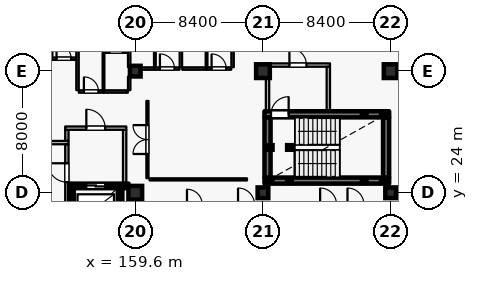
"""IFC4 building model, lengths in metres.
Left out: names, types, materials, properties, quantities, classifications, styles, units other than length and angle.
Written with IfcOpenShell. Run it as: python <this file> out.ifc"""

import sys

from ifc_helpers import new_model, si_unit, direction, frame, frame_2d, origin, origin_2d, place, context, subcontext, project, spatial, rectangle, hollow_rectangle, extrude, element, fill, save


model = new_model("IFC4")
c1 = context("Model", 3, precision=1e-05, world=origin(), true_north=direction((0.0, 1.0)))
c2 = subcontext(c1, "Body", "Model", "MODEL_VIEW")
j1 = project(units=[si_unit("LENGTHUNIT", "METRE"), si_unit("PLANEANGLEUNIT", "RADIAN")], contexts=[c1])
p1 = place(None, origin())
s1 = spatial("IfcSite", under=j1, at=p1, CompositionType="ELEMENT")
p2 = place(p1, origin())
s2 = spatial("IfcBuilding", under=s1, at=p2, CompositionType="ELEMENT")
p3 = place(p2, frame((0.0, 0.0, 25.2)))
s3 = spatial("IfcBuildingStorey", under=s2, at=p3, CompositionType="ELEMENT", Elevation=25.2)
for number, where, z_axis, x_axis in (
    (1, (159.6, 24.0, 0.0), (0.0, 0.0, 1.0), (1.0, 0.0, 0.0)),
    (2, (168.0, 32.0, 0.0), (0.0, 0.0, 1.0), (1.0, 0.0, 0.0)),
    (3, (176.4, 32.0, 0.0), (0.0, 0.0, 1.0), (1.0, 0.0, 0.0)),
):
    element("IfcColumn", number, at=place(p3, frame(where, z_axis=z_axis, x_axis=x_axis)), inside=s3, PredefinedType="COLUMN", context=c2, shape_type="SweptSolid", body=[
        extrude(rectangle(XDim=0.9, YDim=0.9, at=origin_2d()), origin(), (0.0, 0.0, 1.0), 3.6),
    ])
for number, where, z_axis, x_axis in (
    (4, (159.6, 32.0, 0.0), (0.0, 0.0, 1.0), (1.0, 0.0, 0.0)),
    (5, (168.0, 24.0, 0.0), (0.0, 0.0, 1.0), (1.0, 0.0, 0.0)),
    (6, (176.4, 24.0, 0.0), (0.0, 0.0, 1.0), (1.0, 0.0, 0.0)),
):
    element("IfcColumn", number, at=place(p3, frame(where, z_axis=z_axis, x_axis=x_axis)), inside=s3, PredefinedType="COLUMN", context=c2, shape_type="SweptSolid", body=[
        extrude(rectangle(XDim=0.7, YDim=0.7, at=origin_2d()), origin(), (0.0, 0.0, 1.0), 3.6),
    ])
p4 = place(p3, frame((184.4, 23.619, 0.0), z_axis=(0.0, 0.0, 1.0), x_axis=(-0.724145676014, -0.689647040094, 0.0)))
e7 = element("IfcWall", 7, at=p4, inside=s3, PredefinedType="SOLIDWALL", context=c2, shape_type="SweptSolid", body=[
    extrude(rectangle(XDim=10.495, YDim=0.24, at=frame_2d((5.248, 0.0))), origin(), (0.0, 0.0, 1.0), 2.89),
])
p5 = place(p4, frame((2.288, 0.0, 0.0)))
e8 = element("IfcOpeningElement", 8, at=p5, cuts=e7, PredefinedType="OPENING", context=c2, shape_type="SweptSolid", body=[
    extrude(rectangle(XDim=1.5, YDim=2.25, at=frame_2d((0.75, 1.125))), frame((0.0, 0.13, 0.0), z_axis=(0.0, -1.0, 0.0), x_axis=(1.0, 0.0, 0.0)), (0.0, 0.0, 1.0), 0.26),
])
p6 = place(p4, frame((7.009, 0.0, 0.8)))
e9 = element("IfcOpeningElement", 9, at=p6, cuts=e7, PredefinedType="OPENING", context=c2, shape_type="SweptSolid", body=[
    extrude(rectangle(XDim=2.0, YDim=1.75, at=frame_2d((1.0, 0.875))), frame((0.0, 0.13, 0.0), z_axis=(0.0, -1.0, 0.0), x_axis=(1.0, 0.0, 0.0)), (0.0, 0.0, 1.0), 0.26),
])
p7 = place(p3, frame((158.6, 21.705, 0.0), z_axis=(0.0, 0.0, 1.0), x_axis=(0.0, 1.0, 0.0)))
e10 = element("IfcWall", 10, at=p7, inside=s3, PredefinedType="SHEAR", context=c2, shape_type="SweptSolid", body=[
    extrude(rectangle(XDim=2.59, YDim=0.3, at=frame_2d((1.295, 0.0))), origin(), (0.0, 0.0, 1.0), 3.335),
])
p8 = place(p3, frame((159.16, 24.45, 0.0), z_axis=(0.0, 0.0, 1.0), x_axis=(-1.0, 0.0, 0.0)))
e11 = element("IfcWall", 11, at=p8, inside=s3, PredefinedType="SHEAR", context=c2, shape_type="SweptSolid", body=[
    extrude(rectangle(XDim=3.91, YDim=0.3, at=frame_2d((1.955, 0.0))), origin(), (0.0, 0.0, 1.0), 3.335),
])
p9 = place(p8, frame((1.535, 0.0, 0.0)))
e12 = element("IfcOpeningElement", 12, at=p9, cuts=e11, PredefinedType="OPENING", context=c2, shape_type="SweptSolid", body=[
    extrude(rectangle(XDim=1.25, YDim=2.25, at=frame_2d((0.625, 1.125))), frame((0.0, 0.16, 0.0), z_axis=(0.0, -1.0, 0.0), x_axis=(1.0, 0.0, 0.0)), (0.0, 0.0, 1.0), 0.32),
])
p10 = place(p3, frame((155.4, 24.295, 0.0), z_axis=(0.0, 0.0, 1.0), x_axis=(0.0, -1.0, 0.0)))
e13 = element("IfcWall", 13, at=p10, inside=s3, PredefinedType="SHEAR", context=c2, shape_type="SweptSolid", body=[
    extrude(rectangle(XDim=2.59, YDim=0.3, at=frame_2d((1.295, 0.0))), origin(), (0.0, 0.0, 1.0), 3.335),
])
p11 = place(p3, frame((151.39, 27.3, 0.0), z_axis=(0.0, 0.0, 1.0), x_axis=(1.0, 0.0, 0.0)))
e14 = element("IfcWall", 14, at=p11, inside=s3, PredefinedType="PARTITIONING", context=c2, shape_type="SweptSolid", body=[
    extrude(rectangle(XDim=3.82, YDim=0.22, at=frame_2d((1.91, 0.0))), origin(), (0.0, 0.0, 1.0), 3.335),
])
p12 = place(p11, frame((1.35, 0.0, 0.0)))
e15 = element("IfcOpeningElement", 15, at=p12, cuts=e14, PredefinedType="OPENING", context=c2, shape_type="SweptSolid", body=[
    extrude(rectangle(XDim=1.12, YDim=2.2, at=frame_2d((0.56, 1.1))), frame((0.0, 0.12, 0.0), z_axis=(0.0, -1.0, 0.0), x_axis=(1.0, 0.0, 0.0)), (0.0, 0.0, 1.0), 0.24),
])
p13 = place(p3, frame((155.1, 21.365, 0.0), z_axis=(0.0, 0.0, 1.0), x_axis=(0.0, 1.0, 0.0)))
e16 = element("IfcWall", 16, at=p13, inside=s3, PredefinedType="PARTITIONING", context=c2, shape_type="SweptSolid", body=[
    extrude(rectangle(XDim=5.82, YDim=0.22, at=frame_2d((2.91, 0.0))), origin(), (0.0, 0.0, 1.0), 3.335),
])
p14 = place(p13, frame((3.335, 0.0, 0.0)))
e17 = element("IfcOpeningElement", 17, at=p14, cuts=e16, PredefinedType="OPENING", context=c2, shape_type="SweptSolid", body=[
    extrude(rectangle(XDim=1.24, YDim=2.2, at=frame_2d((0.62, 1.1))), frame((0.0, 0.12, 0.0), z_axis=(0.0, -1.0, 0.0), x_axis=(1.0, 0.0, 0.0)), (0.0, 0.0, 1.0), 0.24),
])
p15 = place(p3, frame((155.1, 27.415, 0.0), z_axis=(0.0, 0.0, 1.0), x_axis=(0.0, 1.0, 0.0)))
e18 = element("IfcWall", 18, at=p15, inside=s3, PredefinedType="PARTITIONING", context=c2, shape_type="SweptSolid", body=[
    extrude(rectangle(XDim=0.72, YDim=0.22, at=frame_2d((0.36, 0.0))), origin(), (0.0, 0.0, 1.0), 3.335),
])
p16 = place(p3, frame((158.9, 24.605, 0.0), z_axis=(0.0, 0.0, 1.0), x_axis=(0.0, 1.0, 0.0)))
e19 = element("IfcWall", 19, at=p16, inside=s3, PredefinedType="PARTITIONING", context=c2, shape_type="SweptSolid", body=[
    extrude(rectangle(XDim=3.53, YDim=0.22, at=frame_2d((1.765, 0.0))), origin(), (0.0, 0.0, 1.0), 3.335),
])
p17 = place(p3, frame((154.99, 28.25, 0.0), z_axis=(0.0, 0.0, 1.0), x_axis=(1.0, 0.0, 0.0)))
e20 = element("IfcWall", 20, at=p17, inside=s3, PredefinedType="PARTITIONING", context=c2, shape_type="SweptSolid", body=[
    extrude(rectangle(XDim=4.02, YDim=0.22, at=frame_2d((2.01, 0.0))), origin(), (0.0, 0.0, 1.0), 3.335),
])
p18 = place(p17, frame((1.39, 0.0, 0.0)))
e21 = element("IfcOpeningElement", 21, at=p18, cuts=e20, PredefinedType="OPENING", context=c2, shape_type="SweptSolid", body=[
    extrude(rectangle(XDim=1.24, YDim=2.2, at=frame_2d((0.62, 1.1))), frame((0.0, 0.12, 0.0), z_axis=(0.0, -1.0, 0.0), x_axis=(1.0, 0.0, 0.0)), (0.0, 0.0, 1.0), 0.24),
])
p19 = place(p3, frame((168.1, 24.8, 0.0), z_axis=(0.0, 0.0, 1.0), x_axis=(1.0, 0.0, 0.0)))
e22 = element("IfcWall", 22, at=p19, inside=s3, PredefinedType="SHEAR", context=c2, shape_type="SweptSolid", body=[
    extrude(rectangle(XDim=8.2, YDim=0.4, at=frame_2d((4.1, 0.0))), origin(), (0.0, 0.0, 1.0), 3.335),
])
p20 = place(p3, frame((176.1, 25.005, 0.0), z_axis=(0.0, 0.0, 1.0), x_axis=(0.0, 1.0, 0.0)))
e23 = element("IfcWall", 23, at=p20, inside=s3, PredefinedType="SHEAR", context=c2, shape_type="SweptSolid", body=[
    extrude(rectangle(XDim=3.95, YDim=0.4, at=frame_2d((1.975, 0.0))), origin(), (0.0, 0.0, 1.0), 3.335),
])
p21 = place(p3, frame((168.1, 29.16, 0.0), z_axis=(0.0, 0.0, 1.0), x_axis=(1.0, 0.0, 0.0)))
e24 = element("IfcWall", 24, at=p21, inside=s3, PredefinedType="SHEAR", context=c2, shape_type="SweptSolid", body=[
    extrude(rectangle(XDim=8.2, YDim=0.4, at=frame_2d((4.1, 0.0))), origin(), (0.0, 0.0, 1.0), 3.335),
])
p22 = place(p21, frame((0.43, 0.0, 0.0)))
e25 = element("IfcOpeningElement", 25, at=p22, cuts=e24, PredefinedType="OPENING", context=c2, shape_type="SweptSolid", body=[
    extrude(rectangle(XDim=1.16, YDim=2.2, at=frame_2d((0.58, 1.1))), frame((0.0, 0.21, 0.0), z_axis=(0.0, -1.0, 0.0), x_axis=(1.0, 0.0, 0.0)), (0.0, 0.0, 1.0), 0.42),
])
p23 = place(p3, frame((168.3, 25.005, 0.0), z_axis=(0.0, 0.0, 1.0), x_axis=(0.0, 1.0, 0.0)))
e26 = element("IfcWall", 26, at=p23, inside=s3, PredefinedType="SHEAR", context=c2, shape_type="SweptSolid", body=[
    extrude(rectangle(XDim=3.95, YDim=0.4, at=frame_2d((1.975, 0.0))), origin(), (0.0, 0.0, 1.0), 3.335),
])
p24 = place(p3, frame((168.3, 29.365, 0.0), z_axis=(0.0, 0.0, 1.0), x_axis=(0.0, 1.0, 0.0)))
e27 = element("IfcWall", 27, at=p24, inside=s3, PredefinedType="PARTITIONING", context=c2, shape_type="SweptSolid", body=[
    extrude(rectangle(XDim=2.92, YDim=0.22, at=frame_2d((1.46, 0.0))), origin(), (0.0, 0.0, 1.0), 3.335),
])
p25 = place(p3, frame((168.19, 32.4, 0.0), z_axis=(0.0, 0.0, 1.0), x_axis=(1.0, 0.0, 0.0)))
e28 = element("IfcWall", 28, at=p25, inside=s3, PredefinedType="PARTITIONING", context=c2, shape_type="SweptSolid", body=[
    extrude(rectangle(XDim=4.22, YDim=0.22, at=frame_2d((2.11, 0.0))), origin(), (0.0, 0.0, 1.0), 3.335),
])
p26 = place(p25, frame((1.55, 0.0, 0.0)))
e29 = element("IfcOpeningElement", 29, at=p26, cuts=e28, PredefinedType="OPENING", context=c2, shape_type="SweptSolid", body=[
    extrude(rectangle(XDim=1.12, YDim=2.2, at=frame_2d((0.56, 1.1))), frame((0.0, 0.12, 0.0), z_axis=(0.0, -1.0, 0.0), x_axis=(1.0, 0.0, 0.0)), (0.0, 0.0, 1.0), 0.24),
])
p27 = place(p3, frame((172.3, 29.365, 0.0), z_axis=(0.0, 0.0, 1.0), x_axis=(0.0, 1.0, 0.0)))
e30 = element("IfcWall", 30, at=p27, inside=s3, PredefinedType="PARTITIONING", context=c2, shape_type="SweptSolid", body=[
    extrude(rectangle(XDim=2.92, YDim=0.22, at=frame_2d((1.46, 0.0))), origin(), (0.0, 0.0, 1.0), 3.335),
])
for number, where, z_axis, x_axis in (
    (31, (168.48, 24.8, 0.0), (0.0, 0.0, 1.0), (1.0, 0.0, 0.0)),
    (32, (168.48, 26.98, 0.0), (0.0, 0.0, 1.0), (1.0, 0.0, 0.0)),
    (33, (169.74, 24.8, 0.0), (0.0, 0.0, 1.0), (1.0, 0.0, 0.0)),
    (34, (169.74, 26.98, 0.0), (0.0, 0.0, 1.0), (1.0, 0.0, 0.0)),
):
    element("IfcColumn", number, at=place(p3, frame(where, z_axis=z_axis, x_axis=x_axis)), inside=s3, PredefinedType="COLUMN", context=c2, shape_type="SweptSolid", body=[
        extrude(hollow_rectangle(XDim=0.3, YDim=0.3, WallThickness=0.012, at=origin_2d()), origin(), (0.0, 0.0, 1.0), 3.42),
    ])
for number, where, z_axis, x_axis in (
    (35, (174.66, 24.8, -2.1), (0.0, 0.0, 1.0), (1.0, 0.0, 0.0)),
    (36, (174.66, 29.16, -2.1), (0.0, 0.0, 1.0), (1.0, 0.0, 0.0)),
    (37, (175.92, 24.8, -2.1), (0.0, 0.0, 1.0), (1.0, 0.0, 0.0)),
    (38, (175.92, 29.16, -2.1), (0.0, 0.0, 1.0), (1.0, 0.0, 0.0)),
):
    element("IfcColumn", number, at=place(p3, frame(where, z_axis=z_axis, x_axis=x_axis)), inside=s3, PredefinedType="COLUMN", context=c2, shape_type="SweptSolid", body=[
        extrude(hollow_rectangle(XDim=0.3, YDim=0.3, WallThickness=0.012, at=origin_2d()), origin(), (0.0, 0.0, 1.0), 3.72),
    ])
p28 = place(p3, frame((154.09, 32.82, 0.0), z_axis=(0.0, 0.0, 1.0), x_axis=(1.0, 0.0, 0.0)))
e39 = element("IfcWall", 39, at=p28, inside=s3, PredefinedType="PARTITIONING", context=c2, shape_type="SweptSolid", body=[
    extrude(rectangle(XDim=1.62, YDim=0.16, at=frame_2d((0.81, 0.0))), origin(), (0.0, 0.0, 1.0), 3.335),
])
p29 = place(p28, frame((0.33, 0.0, 0.0)))
e40 = element("IfcOpeningElement", 40, at=p29, cuts=e39, PredefinedType="OPENING", context=c2, shape_type="SweptSolid", body=[
    extrude(rectangle(XDim=0.96, YDim=2.2, at=frame_2d((0.48, 1.1))), frame((0.0, 0.09, 0.0), z_axis=(0.0, -1.0, 0.0), x_axis=(1.0, 0.0, 0.0)), (0.0, 0.0, 1.0), 0.18),
])
p30 = place(p3, frame((154.09, 32.91, 0.0), z_axis=(0.0, 0.0, 1.0), x_axis=(0.0, 1.0, 0.0)))
e41 = element("IfcWall", 41, at=p30, inside=s3, PredefinedType="PARTITIONING", context=c2, shape_type="SweptSolid", body=[
    extrude(rectangle(XDim=2.45, YDim=0.115, at=frame_2d((1.225, 0.0))), origin(), (0.0, 0.0, 1.0), 3.335),
])
p31 = place(p3, frame((155.89, 30.66, 0.0), z_axis=(0.0, 0.0, 1.0), x_axis=(1.0, 0.0, 0.0)))
e42 = element("IfcWall", 42, at=p31, inside=s3, PredefinedType="PARTITIONING", context=c2, shape_type="SweptSolid", body=[
    extrude(rectangle(XDim=1.62, YDim=0.16, at=frame_2d((0.81, 0.0))), origin(), (0.0, 0.0, 1.0), 3.335),
])
p32 = place(p31, frame((0.33, 0.0, 0.0)))
e43 = element("IfcOpeningElement", 43, at=p32, cuts=e42, PredefinedType="OPENING", context=c2, shape_type="SweptSolid", body=[
    extrude(rectangle(XDim=0.96, YDim=2.2, at=frame_2d((0.48, 1.1))), frame((0.0, 0.09, 0.0), z_axis=(0.0, -1.0, 0.0), x_axis=(1.0, 0.0, 0.0)), (0.0, 0.0, 1.0), 0.18),
])
p33 = place(p3, frame((157.52, 30.66, 0.0), z_axis=(0.0, 0.0, 1.0), x_axis=(1.0, 0.0, 0.0)))
e44 = element("IfcWall", 44, at=p33, inside=s3, PredefinedType="PARTITIONING", context=c2, shape_type="SweptSolid", body=[
    extrude(rectangle(XDim=1.59, YDim=0.16, at=frame_2d((0.795, 0.0))), origin(), (0.0, 0.0, 1.0), 3.335),
])
p34 = place(p3, frame((157.51, 30.75, 0.0), z_axis=(0.0, 0.0, 1.0), x_axis=(0.0, 1.0, 0.0)))
e45 = element("IfcWall", 45, at=p34, inside=s3, PredefinedType="PARTITIONING", context=c2, shape_type="SweptSolid", body=[
    extrude(rectangle(XDim=2.45, YDim=0.115, at=frame_2d((1.225, 0.0))), origin(), (0.0, 0.0, 1.0), 3.335),
])
p35 = place(p3, frame((157.57, 33.26, 0.0), z_axis=(0.0, 0.0, 1.0), x_axis=(1.0, 0.0, 0.0)))
e46 = element("IfcWall", 46, at=p35, inside=s3, PredefinedType="PARTITIONING", context=c2, shape_type="SweptSolid", body=[
    extrude(rectangle(XDim=1.53, YDim=0.115, at=frame_2d((0.765, 0.0))), origin(), (0.0, 0.0, 1.0), 3.335),
])
p36 = place(p35, frame((0.335, 0.0, 0.0)))
e47 = element("IfcOpeningElement", 47, at=p36, cuts=e46, PredefinedType="OPENING", context=c2, shape_type="SweptSolid", body=[
    extrude(rectangle(XDim=0.86, YDim=2.12, at=frame_2d((0.43, 1.06))), frame((0.0, 0.067, 0.0), z_axis=(0.0, -1.0, 0.0), x_axis=(1.0, 0.0, 0.0)), (0.0, 0.0, 1.0), 0.135),
])
p37 = place(p3, frame((155.8, 30.75, 0.0), z_axis=(0.0, 0.0, 1.0), x_axis=(0.0, 1.0, 0.0)))
e48 = element("IfcWall", 48, at=p37, inside=s3, PredefinedType="PARTITIONING", context=c2, shape_type="SweptSolid", body=[
    extrude(rectangle(XDim=8.91, YDim=0.16, at=frame_2d((4.455, 0.0))), origin(), (0.0, 0.0, 1.0), 3.335),
])
p38 = place(p3, frame((159.2, 30.75, 0.0), z_axis=(0.0, 0.0, 1.0), x_axis=(0.0, 1.0, 0.0)))
e49 = element("IfcWall", 49, at=p38, inside=s3, PredefinedType="PARTITIONING", context=c2, shape_type="SweptSolid", body=[
    extrude(rectangle(XDim=0.89, YDim=0.16, at=frame_2d((0.445, 0.0))), origin(), (0.0, 0.0, 1.0), 3.335),
])
p39 = place(p3, frame((159.29, 32.17, 0.0), z_axis=(0.0, 0.0, 1.0), x_axis=(1.0, 0.0, 0.0)))
e50 = element("IfcWall", 50, at=p39, inside=s3, PredefinedType="PARTITIONING", context=c2, shape_type="SweptSolid", body=[
    extrude(rectangle(XDim=1.59, YDim=0.16, at=frame_2d((0.795, 0.0))), origin(), (0.0, 0.0, 1.0), 3.335),
])
p40 = place(p3, frame((160.89, 32.17, 0.0), z_axis=(0.0, 0.0, 1.0), x_axis=(1.0, 0.0, 0.0)))
e51 = element("IfcWall", 51, at=p40, inside=s3, PredefinedType="PARTITIONING", context=c2, shape_type="SweptSolid", body=[
    extrude(rectangle(XDim=1.62, YDim=0.16, at=frame_2d((0.81, 0.0))), origin(), (0.0, 0.0, 1.0), 3.335),
])
p41 = place(p40, frame((0.33, 0.0, 0.0)))
e52 = element("IfcOpeningElement", 52, at=p41, cuts=e51, PredefinedType="OPENING", context=c2, shape_type="SweptSolid", body=[
    extrude(rectangle(XDim=0.96, YDim=2.2, at=frame_2d((0.48, 1.1))), frame((0.0, 0.09, 0.0), z_axis=(0.0, -1.0, 0.0), x_axis=(1.0, 0.0, 0.0)), (0.0, 0.0, 1.0), 0.18),
])
p42 = place(p3, frame((160.89, 32.26, 0.0), z_axis=(0.0, 0.0, 1.0), x_axis=(0.0, 1.0, 0.0)))
e53 = element("IfcWall", 53, at=p42, inside=s3, PredefinedType="PARTITIONING", context=c2, shape_type="SweptSolid", body=[
    extrude(rectangle(XDim=2.45, YDim=0.115, at=frame_2d((1.225, 0.0))), origin(), (0.0, 0.0, 1.0), 3.335),
])
p43 = place(p3, frame((159.2, 32.26, 0.0), z_axis=(0.0, 0.0, 1.0), x_axis=(0.0, 1.0, 0.0)))
e54 = element("IfcWall", 54, at=p43, inside=s3, PredefinedType="PARTITIONING", context=c2, shape_type="SweptSolid", body=[
    extrude(rectangle(XDim=7.4, YDim=0.16, at=frame_2d((3.7, 0.0))), origin(), (0.0, 0.0, 1.0), 3.335),
])
p44 = place(p3, frame((162.69, 32.17, 0.0), z_axis=(0.0, 0.0, 1.0), x_axis=(1.0, 0.0, 0.0)))
e55 = element("IfcWall", 55, at=p44, inside=s3, PredefinedType="PARTITIONING", context=c2, shape_type="SweptSolid", body=[
    extrude(rectangle(XDim=1.59, YDim=0.16, at=frame_2d((0.795, 0.0))), origin(), (0.0, 0.0, 1.0), 3.335),
])
p45 = place(p3, frame((164.29, 32.17, 0.0), z_axis=(0.0, 0.0, 1.0), x_axis=(1.0, 0.0, 0.0)))
e56 = element("IfcWall", 56, at=p45, inside=s3, PredefinedType="PARTITIONING", context=c2, shape_type="SweptSolid", body=[
    extrude(rectangle(XDim=1.62, YDim=0.16, at=frame_2d((0.81, 0.0))), origin(), (0.0, 0.0, 1.0), 3.335),
])
p46 = place(p45, frame((0.33, 0.0, 0.0)))
e57 = element("IfcOpeningElement", 57, at=p46, cuts=e56, PredefinedType="OPENING", context=c2, shape_type="SweptSolid", body=[
    extrude(rectangle(XDim=0.96, YDim=2.2, at=frame_2d((0.48, 1.1))), frame((0.0, 0.09, 0.0), z_axis=(0.0, -1.0, 0.0), x_axis=(1.0, 0.0, 0.0)), (0.0, 0.0, 1.0), 0.18),
])
p47 = place(p3, frame((164.29, 32.26, 0.0), z_axis=(0.0, 0.0, 1.0), x_axis=(0.0, 1.0, 0.0)))
e58 = element("IfcWall", 58, at=p47, inside=s3, PredefinedType="PARTITIONING", context=c2, shape_type="SweptSolid", body=[
    extrude(rectangle(XDim=2.45, YDim=0.115, at=frame_2d((1.225, 0.0))), origin(), (0.0, 0.0, 1.0), 3.335),
])
p48 = place(p3, frame((162.6, 32.26, 0.0), z_axis=(0.0, 0.0, 1.0), x_axis=(0.0, 1.0, 0.0)))
e59 = element("IfcWall", 59, at=p48, inside=s3, PredefinedType="PARTITIONING", context=c2, shape_type="SweptSolid", body=[
    extrude(rectangle(XDim=10.26, YDim=0.16, at=frame_2d((5.13, 0.0))), origin(), (0.0, 0.0, 1.0), 3.335),
])
p49 = place(p3, frame((166.0, 32.26, 0.0), z_axis=(0.0, 0.0, 1.0), x_axis=(0.0, 1.0, 0.0)))
e60 = element("IfcWall", 60, at=p49, inside=s3, PredefinedType="PARTITIONING", context=c2, shape_type="SweptSolid", body=[
    extrude(rectangle(XDim=8.64, YDim=0.16, at=frame_2d((4.32, 0.0))), origin(), (0.0, 0.0, 1.0), 3.335),
])
p50 = place(p3, frame((160.4, 24.96, 0.0), z_axis=(0.0, 0.0, 1.0), x_axis=(0.0, 1.0, 0.0)))
e61 = element("IfcWall", 61, at=p50, inside=s3, PredefinedType="PARTITIONING", context=c2, shape_type="SweptSolid", body=[
    extrude(rectangle(XDim=5.08, YDim=0.14, at=frame_2d((2.54, 0.0))), origin(), (0.0, 0.0, 1.0), 3.335),
])
p51 = place(p50, frame((1.59, 0.0, 0.0)))
e62 = element("IfcOpeningElement", 62, at=p51, cuts=e61, PredefinedType="OPENING", context=c2, shape_type="SweptSolid", body=[
    extrude(rectangle(XDim=1.9, YDim=2.4, at=frame_2d((0.95, 1.2))), frame((0.0, 0.08, 0.0), z_axis=(0.0, -1.0, 0.0), x_axis=(1.0, 0.0, 0.0)), (0.0, 0.0, 1.0), 0.16),
])
p52 = place(p3, frame((160.54, 24.88, 0.0), z_axis=(0.0, 0.0, 1.0), x_axis=(1.0, 0.0, 0.0)))
e63 = element("IfcWall", 63, at=p52, inside=s3, PredefinedType="PARTITIONING", context=c2, shape_type="SweptSolid", body=[
    extrude(rectangle(XDim=6.41, YDim=0.14, at=frame_2d((3.205, 0.0))), origin(), (0.0, 0.0, 1.0), 3.335),
])
p53 = place(p9, origin())
e64 = element("IfcDoor", 64, at=p53, inside=s3, OperationType="DOUBLE_DOOR_SLIDING", PredefinedType="DOOR", context=c2, shape_type="SweptSolid", body=[
    extrude(rectangle(XDim=1.25, YDim=2.25, at=frame_2d((0.625, 1.125))), frame((0.0, 0.025, 0.0), z_axis=(0.0, -1.0, 0.0), x_axis=(1.0, 0.0, 0.0)), (0.0, 0.0, 1.0), 0.05),
])
fill(e12, e64)
p54 = place(p14, origin())
e65 = element("IfcDoor", 65, at=p54, inside=s3, OperationType="SINGLE_SWING_RIGHT", PredefinedType="DOOR", context=c2, shape_type="SweptSolid", body=[
    extrude(rectangle(XDim=1.24, YDim=2.2, at=frame_2d((0.62, 1.1))), frame((0.0, 0.025, 0.0), z_axis=(0.0, -1.0, 0.0), x_axis=(1.0, 0.0, 0.0)), (0.0, 0.0, 1.0), 0.05),
])
fill(e17, e65)
p55 = place(p18, origin())
e66 = element("IfcDoor", 66, at=p55, inside=s3, OperationType="SINGLE_SWING_LEFT", PredefinedType="DOOR", context=c2, shape_type="SweptSolid", body=[
    extrude(rectangle(XDim=1.24, YDim=2.2, at=frame_2d((0.62, 1.1))), frame((0.0, 0.025, 0.0), z_axis=(0.0, -1.0, 0.0), x_axis=(1.0, 0.0, 0.0)), (0.0, 0.0, 1.0), 0.05),
])
fill(e21, e66)
p56 = place(p22, origin())
e67 = element("IfcDoor", 67, at=p56, inside=s3, OperationType="SINGLE_SWING_RIGHT", PredefinedType="DOOR", context=c2, shape_type="SweptSolid", body=[
    extrude(rectangle(XDim=1.16, YDim=2.2, at=frame_2d((0.58, 1.1))), frame((0.0, 0.025, 0.0), z_axis=(0.0, -1.0, 0.0), x_axis=(1.0, 0.0, 0.0)), (0.0, 0.0, 1.0), 0.05),
])
fill(e25, e67)
p57 = place(p26, origin())
e68 = element("IfcDoor", 68, at=p57, inside=s3, OperationType="SINGLE_SWING_LEFT", PredefinedType="DOOR", context=c2, shape_type="SweptSolid", body=[
    extrude(rectangle(XDim=1.12, YDim=2.2, at=frame_2d((0.56, 1.1))), frame((0.0, 0.025, 0.0), z_axis=(0.0, -1.0, 0.0), x_axis=(1.0, 0.0, 0.0)), (0.0, 0.0, 1.0), 0.05),
])
fill(e29, e68)
p58 = place(p29, origin())
e69 = element("IfcDoor", 69, at=p58, inside=s3, OperationType="SINGLE_SWING_LEFT", PredefinedType="DOOR", context=c2, shape_type="SweptSolid", body=[
    extrude(rectangle(XDim=0.96, YDim=2.2, at=frame_2d((0.48, 1.1))), frame((0.0, 0.025, 0.0), z_axis=(0.0, -1.0, 0.0), x_axis=(1.0, 0.0, 0.0)), (0.0, 0.0, 1.0), 0.05),
])
fill(e40, e69)
p59 = place(p32, origin())
e70 = element("IfcDoor", 70, at=p59, inside=s3, OperationType="SINGLE_SWING_LEFT", PredefinedType="DOOR", context=c2, shape_type="SweptSolid", body=[
    extrude(rectangle(XDim=0.96, YDim=2.2, at=frame_2d((0.48, 1.1))), frame((0.0, 0.025, 0.0), z_axis=(0.0, -1.0, 0.0), x_axis=(1.0, 0.0, 0.0)), (0.0, 0.0, 1.0), 0.05),
])
fill(e43, e70)
p60 = place(p36, origin())
e71 = element("IfcDoor", 71, at=p60, inside=s3, OperationType="SINGLE_SWING_RIGHT", PredefinedType="DOOR", context=c2, shape_type="SweptSolid", body=[
    extrude(rectangle(XDim=0.86, YDim=2.12, at=frame_2d((0.43, 1.06))), frame((0.0, 0.025, 0.0), z_axis=(0.0, -1.0, 0.0), x_axis=(1.0, 0.0, 0.0)), (0.0, 0.0, 1.0), 0.05),
])
fill(e47, e71)
p61 = place(p41, origin())
e72 = element("IfcDoor", 72, at=p61, inside=s3, OperationType="SINGLE_SWING_LEFT", PredefinedType="DOOR", context=c2, shape_type="SweptSolid", body=[
    extrude(rectangle(XDim=0.96, YDim=2.2, at=frame_2d((0.48, 1.1))), frame((0.0, 0.025, 0.0), z_axis=(0.0, -1.0, 0.0), x_axis=(1.0, 0.0, 0.0)), (0.0, 0.0, 1.0), 0.05),
])
fill(e52, e72)
p62 = place(p46, origin())
e73 = element("IfcDoor", 73, at=p62, inside=s3, OperationType="SINGLE_SWING_LEFT", PredefinedType="DOOR", context=c2, shape_type="SweptSolid", body=[
    extrude(rectangle(XDim=0.96, YDim=2.2, at=frame_2d((0.48, 1.1))), frame((0.0, 0.025, 0.0), z_axis=(0.0, -1.0, 0.0), x_axis=(1.0, 0.0, 0.0)), (0.0, 0.0, 1.0), 0.05),
])
fill(e57, e73)
p63 = place(p51, origin())
e74 = element("IfcDoor", 74, at=p63, inside=s3, OperationType="DOUBLE_DOOR_SINGLE_SWING", PredefinedType="DOOR", context=c2, shape_type="SweptSolid", body=[
    extrude(rectangle(XDim=1.9, YDim=2.4, at=frame_2d((0.95, 1.2))), frame((0.0, 0.025, 0.0), z_axis=(0.0, -1.0, 0.0), x_axis=(1.0, 0.0, 0.0)), (0.0, 0.0, 1.0), 0.05),
])
fill(e62, e74)
save(model, sys.argv[1])
